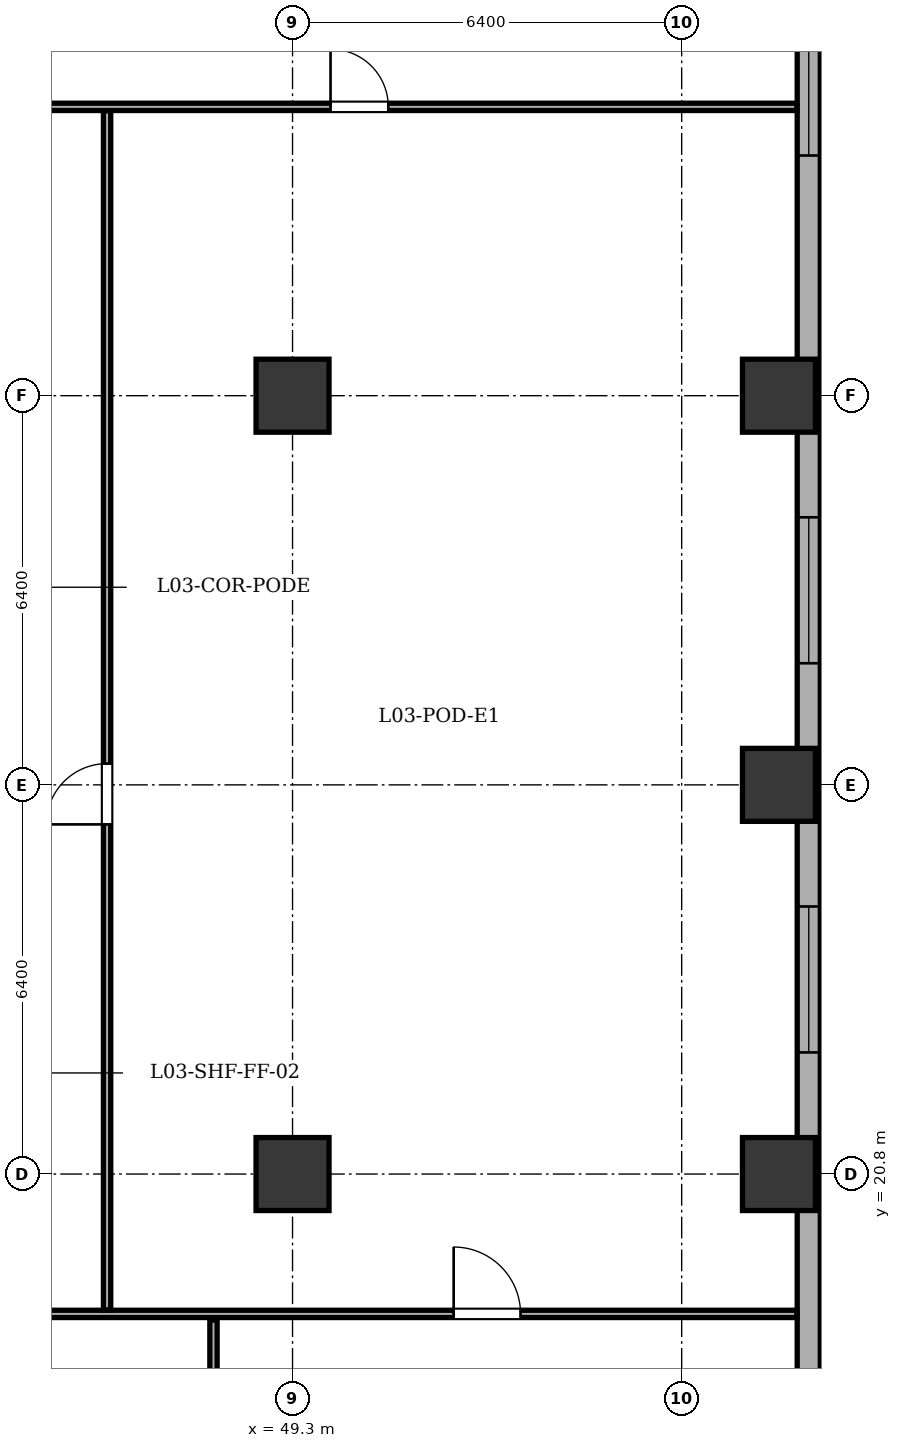
"""IFC4 building model, lengths in metres.
Left out: names, types, materials, properties, quantities, classifications, styles, units other than length and angle.
Written with IfcOpenShell. Run it as: python <this file> out.ifc"""

import sys

from ifc_helpers import new_model, si_unit, direction, frame, frame_2d, origin, origin_2d, place, context, subcontext, project, spatial, rectangle, extrude, element, fill, save


model = new_model("IFC4")
c1 = context("Model", 3, precision=1e-05, world=origin(), true_north=direction((0.0, 1.0)))
c2 = subcontext(c1, "Body", "Model", "MODEL_VIEW")
j1 = project(units=[si_unit("LENGTHUNIT", "METRE"), si_unit("PLANEANGLEUNIT", "RADIAN")], contexts=[c1])
p1 = place(None, origin())
s1 = spatial("IfcSite", under=j1, at=p1, CompositionType="ELEMENT")
p2 = place(p1, origin())
s2 = spatial("IfcBuilding", under=s1, at=p2, CompositionType="ELEMENT")
p3 = place(p2, frame((0.0, 0.0, 14.4)))
s3 = spatial("IfcBuildingStorey", under=s2, at=p3, CompositionType="ELEMENT", Elevation=14.4)
for number, where, z_axis, x_axis in (
    (1, (57.3, 20.8, 0.0), (0.0, 0.0, 1.0), (1.0, 0.0, 0.0)),
    (2, (57.3, 27.2, 0.0), (0.0, 0.0, 1.0), (1.0, 0.0, 0.0)),
    (3, (57.3, 33.6, 0.0), (0.0, 0.0, 1.0), (1.0, 0.0, 0.0)),
    (4, (49.3, 20.8, 0.0), (0.0, 0.0, 1.0), (1.0, 0.0, 0.0)),
    (5, (49.3, 33.6, 0.0), (0.0, 0.0, 1.0), (1.0, 0.0, 0.0)),
):
    element("IfcColumn", number, at=place(p3, frame(where, z_axis=z_axis, x_axis=x_axis)), inside=s3, PredefinedType="COLUMN", context=c2, shape_type="SweptSolid", body=[
        extrude(rectangle(XDim=1.2, YDim=1.2, at=origin_2d()), origin(), (0.0, 0.0, 1.0), 4.5),
    ])
p4 = place(p3, frame((57.79, 49.9, 0.0), z_axis=(0.0, 0.0, 1.0), x_axis=(0.0, -1.0, 0.0)))
e6 = element("IfcWall", 6, at=p4, inside=s3, PredefinedType="STANDARD", context=c2, shape_type="SweptSolid", body=[
    extrude(rectangle(XDim=45.4, YDim=0.38, at=frame_2d((22.7, 0.0))), origin(), (0.0, 0.0, 1.0), 4.0),
])
p5 = place(p4, frame((1.275, 0.0, 0.75)))
e7 = element("IfcOpeningElement", 7, at=p5, cuts=e6, PredefinedType="OPENING", context=c2, shape_type="SweptSolid", body=[
    extrude(rectangle(XDim=2.4, YDim=2.1, at=frame_2d((1.2, 1.05))), frame((0.0, 0.2, 0.0), z_axis=(0.0, -1.0, 0.0), x_axis=(1.0, 0.0, 0.0)), (0.0, 0.0, 1.0), 0.4),
])
p6 = place(p4, frame((9.95, 0.0, 0.75)))
e8 = element("IfcOpeningElement", 8, at=p6, cuts=e6, PredefinedType="OPENING", context=c2, shape_type="SweptSolid", body=[
    extrude(rectangle(XDim=2.4, YDim=2.1, at=frame_2d((1.2, 1.05))), frame((0.0, 0.2, 0.0), z_axis=(0.0, -1.0, 0.0), x_axis=(1.0, 0.0, 0.0)), (0.0, 0.0, 1.0), 0.4),
])
p7 = place(p4, frame((18.3, 0.0, 0.75)))
e9 = element("IfcOpeningElement", 9, at=p7, cuts=e6, PredefinedType="OPENING", context=c2, shape_type="SweptSolid", body=[
    extrude(rectangle(XDim=2.4, YDim=2.1, at=frame_2d((1.2, 1.05))), frame((0.0, 0.2, 0.0), z_axis=(0.0, -1.0, 0.0), x_axis=(1.0, 0.0, 0.0)), (0.0, 0.0, 1.0), 0.4),
])
p8 = place(p4, frame((24.7, 0.0, 0.75)))
e10 = element("IfcOpeningElement", 10, at=p8, cuts=e6, PredefinedType="OPENING", context=c2, shape_type="SweptSolid", body=[
    extrude(rectangle(XDim=2.4, YDim=2.1, at=frame_2d((1.2, 1.05))), frame((0.0, 0.2, 0.0), z_axis=(0.0, -1.0, 0.0), x_axis=(1.0, 0.0, 0.0)), (0.0, 0.0, 1.0), 0.4),
])
p9 = place(p4, frame((33.05, 0.0, 0.75)))
e11 = element("IfcOpeningElement", 11, at=p9, cuts=e6, PredefinedType="OPENING", context=c2, shape_type="SweptSolid", body=[
    extrude(rectangle(XDim=2.4, YDim=2.1, at=frame_2d((1.2, 1.05))), frame((0.0, 0.2, 0.0), z_axis=(0.0, -1.0, 0.0), x_axis=(1.0, 0.0, 0.0)), (0.0, 0.0, 1.0), 0.4),
])
p10 = place(p4, frame((41.725, 0.0, 0.75)))
e12 = element("IfcOpeningElement", 12, at=p10, cuts=e6, PredefinedType="OPENING", context=c2, shape_type="SweptSolid", body=[
    extrude(rectangle(XDim=2.4, YDim=2.1, at=frame_2d((1.2, 1.05))), frame((0.0, 0.2, 0.0), z_axis=(0.0, -1.0, 0.0), x_axis=(1.0, 0.0, 0.0)), (0.0, 0.0, 1.0), 0.4),
])
p11 = place(p3, frame((26.015, 18.5, 0.0), z_axis=(0.0, 0.0, 1.0), x_axis=(1.0, 0.0, 0.0)))
e13 = element("IfcWall", 13, at=p11, inside=s3, PredefinedType="PARTITIONING", context=c2, shape_type="SweptSolid", body=[
    extrude(rectangle(XDim=31.58, YDim=0.12, at=frame_2d((15.79, 0.0))), origin(), (0.0, 0.0, 1.0), 3.435),
])
p12 = place(p11, frame((5.61, 0.0, 0.0)))
e14 = element("IfcOpeningElement", 14, at=p12, cuts=e13, PredefinedType="OPENING", context=c2, shape_type="SweptSolid", body=[
    extrude(rectangle(XDim=1.1, YDim=2.15, at=frame_2d((0.55, 1.075))), frame((0.0, 0.07, 0.0), z_axis=(0.0, -1.0, 0.0), x_axis=(1.0, 0.0, 0.0)), (0.0, 0.0, 1.0), 0.14),
])
p13 = place(p11, frame((17.785, 0.0, 0.0)))
e15 = element("IfcOpeningElement", 15, at=p13, cuts=e13, PredefinedType="OPENING", context=c2, shape_type="SweptSolid", body=[
    extrude(rectangle(XDim=1.1, YDim=2.15, at=frame_2d((0.55, 1.075))), frame((0.0, 0.07, 0.0), z_axis=(0.0, -1.0, 0.0), x_axis=(1.0, 0.0, 0.0)), (0.0, 0.0, 1.0), 0.14),
])
p14 = place(p11, frame((25.935, 0.0, 0.0)))
e16 = element("IfcOpeningElement", 16, at=p14, cuts=e13, PredefinedType="OPENING", context=c2, shape_type="SweptSolid", body=[
    extrude(rectangle(XDim=1.1, YDim=2.15, at=frame_2d((0.55, 1.075))), frame((0.0, 0.07, 0.0), z_axis=(0.0, -1.0, 0.0), x_axis=(1.0, 0.0, 0.0)), (0.0, 0.0, 1.0), 0.14),
])
p15 = place(p3, frame((48.0, 1.905, 0.0), z_axis=(0.0, 0.0, 1.0), x_axis=(0.0, 1.0, 0.0)))
e17 = element("IfcWall", 17, at=p15, inside=s3, PredefinedType="PARTITIONING", context=c2, shape_type="SweptSolid", body=[
    extrude(rectangle(XDim=16.495, YDim=0.12, at=frame_2d((8.248, 0.0))), origin(), (0.0, 0.0, 1.0), 4.0),
])
p16 = place(p3, frame((2.805, 38.35, 0.0), z_axis=(0.0, 0.0, 1.0), x_axis=(1.0, 0.0, 0.0)))
e18 = element("IfcWall", 18, at=p16, inside=s3, PredefinedType="PARTITIONING", context=c2, shape_type="SweptSolid", body=[
    extrude(rectangle(XDim=54.79, YDim=0.12, at=frame_2d((27.395, 0.0))), origin(), (0.0, 0.0, 1.0), 4.0),
])
p17 = place(p16, frame((5.37, 0.0, 0.0)))
e19 = element("IfcOpeningElement", 19, at=p17, cuts=e18, PredefinedType="OPENING", context=c2, shape_type="SweptSolid", body=[
    extrude(rectangle(XDim=0.95, YDim=2.1, at=frame_2d((0.475, 1.05))), frame((0.0, 0.07, 0.0), z_axis=(0.0, -1.0, 0.0), x_axis=(1.0, 0.0, 0.0)), (0.0, 0.0, 1.0), 0.14),
])
p18 = place(p16, frame((15.12, 0.0, 0.0)))
e20 = element("IfcOpeningElement", 20, at=p18, cuts=e18, PredefinedType="OPENING", context=c2, shape_type="SweptSolid", body=[
    extrude(rectangle(XDim=0.95, YDim=2.1, at=frame_2d((0.475, 1.05))), frame((0.0, 0.07, 0.0), z_axis=(0.0, -1.0, 0.0), x_axis=(1.0, 0.0, 0.0)), (0.0, 0.0, 1.0), 0.14),
])
p19 = place(p16, frame((20.12, 0.0, 0.0)))
e21 = element("IfcOpeningElement", 21, at=p19, cuts=e18, PredefinedType="OPENING", context=c2, shape_type="SweptSolid", body=[
    extrude(rectangle(XDim=0.95, YDim=2.1, at=frame_2d((0.475, 1.05))), frame((0.0, 0.07, 0.0), z_axis=(0.0, -1.0, 0.0), x_axis=(1.0, 0.0, 0.0)), (0.0, 0.0, 1.0), 0.14),
])
p20 = place(p16, frame((24.87, 0.0, 0.0)))
e22 = element("IfcOpeningElement", 22, at=p20, cuts=e18, PredefinedType="OPENING", context=c2, shape_type="SweptSolid", body=[
    extrude(rectangle(XDim=0.95, YDim=2.1, at=frame_2d((0.475, 1.05))), frame((0.0, 0.07, 0.0), z_axis=(0.0, -1.0, 0.0), x_axis=(1.0, 0.0, 0.0)), (0.0, 0.0, 1.0), 0.14),
])
p21 = place(p16, frame((34.12, 0.0, 0.0)))
e23 = element("IfcOpeningElement", 23, at=p21, cuts=e18, PredefinedType="OPENING", context=c2, shape_type="SweptSolid", body=[
    extrude(rectangle(XDim=0.95, YDim=2.1, at=frame_2d((0.475, 1.05))), frame((0.0, 0.07, 0.0), z_axis=(0.0, -1.0, 0.0), x_axis=(1.0, 0.0, 0.0)), (0.0, 0.0, 1.0), 0.14),
])
p22 = place(p16, frame((47.12, 0.0, 0.0)))
e24 = element("IfcOpeningElement", 24, at=p22, cuts=e18, PredefinedType="OPENING", context=c2, shape_type="SweptSolid", body=[
    extrude(rectangle(XDim=0.95, YDim=2.1, at=frame_2d((0.475, 1.05))), frame((0.0, 0.07, 0.0), z_axis=(0.0, -1.0, 0.0), x_axis=(1.0, 0.0, 0.0)), (0.0, 0.0, 1.0), 0.14),
])
p23 = place(p3, frame((46.25, 18.565, 0.0), z_axis=(0.0, 0.0, 1.0), x_axis=(0.0, 1.0, 0.0)))
e25 = element("IfcWall", 25, at=p23, inside=s3, PredefinedType="PARTITIONING", context=c2, shape_type="SweptSolid", body=[
    extrude(rectangle(XDim=19.72, YDim=0.12, at=frame_2d((9.86, 0.0))), origin(), (0.0, 0.0, 1.0), 4.0),
])
p24 = place(p23, frame((7.985, 0.0, 0.0)))
e26 = element("IfcOpeningElement", 26, at=p24, cuts=e25, PredefinedType="OPENING", context=c2, shape_type="SweptSolid", body=[
    extrude(rectangle(XDim=1.0, YDim=2.1, at=frame_2d((0.5, 1.05))), frame((0.0, 0.07, 0.0), z_axis=(0.0, -1.0, 0.0), x_axis=(1.0, 0.0, 0.0)), (0.0, 0.0, 1.0), 0.14),
])
p25 = place(p6, origin())
e27 = element("IfcWindow", 27, at=p25, inside=s3, PartitioningType="SINGLE_PANEL", PredefinedType="WINDOW", context=c2, shape_type="SweptSolid", body=[
    extrude(rectangle(XDim=2.4, YDim=2.1, at=frame_2d((1.2, 1.05))), frame((0.0, 0.03, 0.0), z_axis=(0.0, -1.0, 0.0), x_axis=(1.0, 0.0, 0.0)), (0.0, 0.0, 1.0), 0.06),
])
fill(e8, e27)
p26 = place(p7, origin())
e28 = element("IfcWindow", 28, at=p26, inside=s3, PartitioningType="SINGLE_PANEL", PredefinedType="WINDOW", context=c2, shape_type="SweptSolid", body=[
    extrude(rectangle(XDim=2.4, YDim=2.1, at=frame_2d((1.2, 1.05))), frame((0.0, 0.03, 0.0), z_axis=(0.0, -1.0, 0.0), x_axis=(1.0, 0.0, 0.0)), (0.0, 0.0, 1.0), 0.06),
])
fill(e9, e28)
p27 = place(p8, origin())
e29 = element("IfcWindow", 29, at=p27, inside=s3, PartitioningType="SINGLE_PANEL", PredefinedType="WINDOW", context=c2, shape_type="SweptSolid", body=[
    extrude(rectangle(XDim=2.4, YDim=2.1, at=frame_2d((1.2, 1.05))), frame((0.0, 0.03, 0.0), z_axis=(0.0, -1.0, 0.0), x_axis=(1.0, 0.0, 0.0)), (0.0, 0.0, 1.0), 0.06),
])
fill(e10, e29)
p28 = place(p14, origin())
e30 = element("IfcDoor", 30, at=p28, inside=s3, OperationType="SINGLE_SWING_LEFT", PredefinedType="DOOR", context=c2, shape_type="SweptSolid", body=[
    extrude(rectangle(XDim=1.1, YDim=2.15, at=frame_2d((0.55, 1.075))), frame((0.0, 0.025, 0.0), z_axis=(0.0, -1.0, 0.0), x_axis=(1.0, 0.0, 0.0)), (0.0, 0.0, 1.0), 0.05),
])
fill(e16, e30)
p29 = place(p22, origin())
e31 = element("IfcDoor", 31, at=p29, inside=s3, OperationType="SINGLE_SWING_LEFT", PredefinedType="DOOR", context=c2, shape_type="SweptSolid", body=[
    extrude(rectangle(XDim=0.95, YDim=2.1, at=frame_2d((0.475, 1.05))), frame((0.0, 0.025, 0.0), z_axis=(0.0, -1.0, 0.0), x_axis=(1.0, 0.0, 0.0)), (0.0, 0.0, 1.0), 0.05),
])
fill(e24, e31)
p30 = place(p24, origin())
e32 = element("IfcDoor", 32, at=p30, inside=s3, OperationType="SINGLE_SWING_LEFT", PredefinedType="DOOR", context=c2, shape_type="SweptSolid", body=[
    extrude(rectangle(XDim=1.0, YDim=2.1, at=frame_2d((0.5, 1.05))), frame((0.0, 0.025, 0.0), z_axis=(0.0, -1.0, 0.0), x_axis=(1.0, 0.0, 0.0)), (0.0, 0.0, 1.0), 0.05),
])
fill(e26, e32)
save(model, sys.argv[1])
